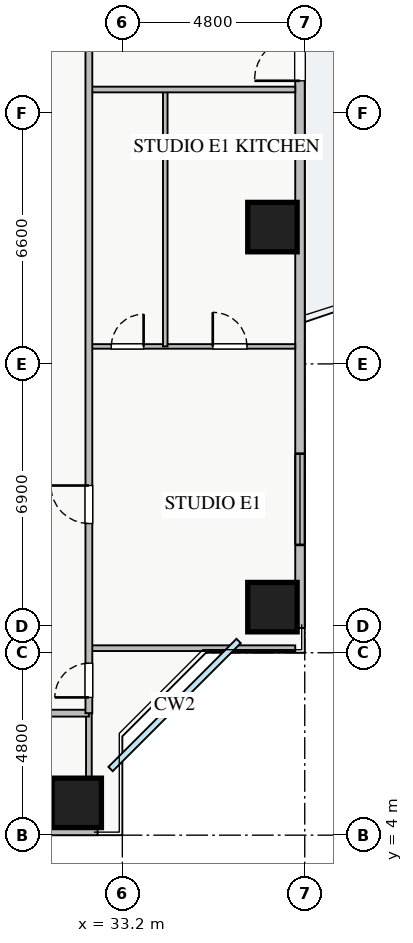
"""IFC4 building model, lengths in metres.
Left out: names, types, materials, properties, quantities, classifications, styles, units other than length and angle.
Written with IfcOpenShell. Run it as: python <this file> out.ifc"""

import sys

from ifc_helpers import new_model, si_unit, direction, frame, frame_2d, origin, origin_2d, place, context, subcontext, project, spatial, rectangle, extrude, source, transform, mapped, element, fill, save


model = new_model("IFC4")
c1 = context("Model", 3, precision=1e-05, world=origin(), true_north=direction((0.0, 1.0)))
c2 = subcontext(c1, "Body", "Model", "MODEL_VIEW")
j1 = project(units=[si_unit("LENGTHUNIT", "METRE"), si_unit("PLANEANGLEUNIT", "RADIAN")], contexts=[c1])
p1 = place(None, origin())
s1 = spatial("IfcSite", under=j1, at=p1, CompositionType="ELEMENT")
p2 = place(p1, origin())
s2 = spatial("IfcBuilding", under=s1, at=p2, CompositionType="ELEMENT")
p3 = place(p2, frame((0.0, 0.0, 69.75)))
s3 = spatial("IfcBuildingStorey", under=s2, at=p3, CompositionType="ELEMENT", Elevation=69.75)
m1 = source(origin(), c2, "Body", "SweptSolid", [
    extrude(rectangle(XDim=1.3, YDim=1.3, at=origin_2d()), origin(), (0.0, 0.0, 1.0), 3.25),
])
for number, where, z_axis, x_axis in (
    (1, (32.0, 4.85, 0.0), (0.0, 0.0, 1.0), (1.0, 0.0, 0.0)),
    (2, (37.15, 10.0, 0.0), (0.0, 0.0, 1.0), (1.0, 0.0, 0.0)),
    (3, (37.15, 20.0, 0.0), (0.0, 0.0, 1.0), (1.0, 0.0, 0.0)),
):
    element("IfcColumn", number, at=place(p3, frame(where, z_axis=z_axis, x_axis=x_axis)), inside=s3, PredefinedType="COLUMN", context=c2, shape_type="MappedRepresentation", body=[
        mapped(m1, transform((0.0, 0.0, 0.0), x_axis=(1.0, 0.0, 0.0), y_axis=(0.0, 1.0, 0.0), z_axis=(0.0, 0.0, 1.0), scale=1.0)),
    ])
p4 = place(p3, frame((5.45, 4.125, 0.0), z_axis=(0.0, 0.0, 1.0), x_axis=(1.0, 0.0, 0.0)))
e4 = element("IfcWall", 4, at=p4, inside=s3, PredefinedType="STANDARD", context=c2, shape_type="SweptSolid", body=[
    extrude(rectangle(XDim=27.1, YDim=0.25, at=frame_2d((13.55, 0.0))), origin(), (0.0, 0.0, 1.0), 2.61),
])
p5 = place(p4, frame((14.4, 0.0, 0.0)))
e5 = element("IfcOpeningElement", 5, at=p5, cuts=e4, PredefinedType="OPENING", context=c2, shape_type="SweptSolid", body=[
    extrude(rectangle(XDim=1.2, YDim=2.1, at=frame_2d((0.6, 1.05))), frame((0.0, 0.135, 0.0), z_axis=(0.0, -1.0, 0.0), x_axis=(1.0, 0.0, 0.0)), (0.0, 0.0, 1.0), 0.27),
])
p6 = place(p4, frame((1.48, 0.0, 0.9)))
e6 = element("IfcOpeningElement", 6, at=p6, cuts=e4, PredefinedType="OPENING", context=c2, shape_type="SweptSolid", body=[
    extrude(rectangle(XDim=1.5, YDim=1.5, at=frame_2d((0.75, 0.75))), frame((0.0, 0.135, 0.0), z_axis=(0.0, -1.0, 0.0), x_axis=(1.0, 0.0, 0.0)), (0.0, 0.0, 1.0), 0.27),
])
p7 = place(p4, frame((9.263, 0.0, 0.9)))
e7 = element("IfcOpeningElement", 7, at=p7, cuts=e4, PredefinedType="OPENING", context=c2, shape_type="SweptSolid", body=[
    extrude(rectangle(XDim=1.8, YDim=1.45, at=frame_2d((0.9, 0.725))), frame((0.0, 0.135, 0.0), z_axis=(0.0, -1.0, 0.0), x_axis=(1.0, 0.0, 0.0)), (0.0, 0.0, 1.0), 0.27),
])
p8 = place(p4, frame((16.188, 0.0, 0.9)))
e8 = element("IfcOpeningElement", 8, at=p8, cuts=e4, PredefinedType="OPENING", context=c2, shape_type="SweptSolid", body=[
    extrude(rectangle(XDim=1.5, YDim=1.45, at=frame_2d((0.75, 0.725))), frame((0.0, 0.135, 0.0), z_axis=(0.0, -1.0, 0.0), x_axis=(1.0, 0.0, 0.0)), (0.0, 0.0, 1.0), 0.27),
])
p9 = place(p4, frame((22.663, 0.0, 0.9)))
e9 = element("IfcOpeningElement", 9, at=p9, cuts=e4, PredefinedType="OPENING", context=c2, shape_type="SweptSolid", body=[
    extrude(rectangle(XDim=2.1, YDim=1.48, at=frame_2d((1.05, 0.74))), frame((0.0, 0.135, 0.0), z_axis=(0.0, -1.0, 0.0), x_axis=(1.0, 0.0, 0.0)), (0.0, 0.0, 1.0), 0.27),
])
p10 = place(p4, frame((5.114, 0.0, 0.9)))
e10 = element("IfcOpeningElement", 10, at=p10, cuts=e4, PredefinedType="OPENING", context=c2, shape_type="SweptSolid", body=[
    extrude(rectangle(XDim=2.4, YDim=1.5, at=frame_2d((1.2, 0.75))), frame((0.0, 0.135, 0.0), z_axis=(0.0, -1.0, 0.0), x_axis=(1.0, 0.0, 0.0)), (0.0, 0.0, 1.0), 0.27),
])
p11 = place(p3, frame((37.875, 9.45, 0.0), z_axis=(0.0, 0.0, 1.0), x_axis=(0.0, 1.0, 0.0)))
e11 = element("IfcWall", 11, at=p11, inside=s3, PredefinedType="STANDARD", context=c2, shape_type="SweptSolid", body=[
    extrude(rectangle(XDim=27.1, YDim=0.25, at=frame_2d((13.55, 0.0))), origin(), (0.0, 0.0, 1.0), 2.61),
])
p12 = place(p11, frame((14.4, 0.0, 0.0)))
e12 = element("IfcOpeningElement", 12, at=p12, cuts=e11, PredefinedType="OPENING", context=c2, shape_type="SweptSolid", body=[
    extrude(rectangle(XDim=1.2, YDim=2.1, at=frame_2d((0.6, 1.05))), frame((0.0, 0.135, 0.0), z_axis=(0.0, -1.0, 0.0), x_axis=(1.0, 0.0, 0.0)), (0.0, 0.0, 1.0), 0.27),
])
p13 = place(p11, frame((2.188, 0.0, 0.9)))
e13 = element("IfcOpeningElement", 13, at=p13, cuts=e11, PredefinedType="OPENING", context=c2, shape_type="SweptSolid", body=[
    extrude(rectangle(XDim=2.4, YDim=1.48, at=frame_2d((1.2, 0.74))), frame((0.0, 0.135, 0.0), z_axis=(0.0, -1.0, 0.0), x_axis=(1.0, 0.0, 0.0)), (0.0, 0.0, 1.0), 0.27),
])
p14 = place(p11, frame((22.663, 0.0, 0.9)))
e14 = element("IfcOpeningElement", 14, at=p14, cuts=e11, PredefinedType="OPENING", context=c2, shape_type="SweptSolid", body=[
    extrude(rectangle(XDim=2.1, YDim=1.48, at=frame_2d((1.05, 0.74))), frame((0.0, 0.135, 0.0), z_axis=(0.0, -1.0, 0.0), x_axis=(1.0, 0.0, 0.0)), (0.0, 0.0, 1.0), 0.27),
])
p15 = place(p11, frame((17.365, 0.0, 0.9)))
e15 = element("IfcOpeningElement", 15, at=p15, cuts=e11, PredefinedType="OPENING", context=c2, shape_type="SweptSolid", body=[
    extrude(rectangle(XDim=0.9, YDim=1.2, at=frame_2d((0.45, 0.6))), frame((0.0, 0.135, 0.0), z_axis=(0.0, -1.0, 0.0), x_axis=(1.0, 0.0, 0.0)), (0.0, 0.0, 1.0), 0.27),
])
p16 = place(p3, frame((32.32, 4.25, 0.0), z_axis=(0.0, 0.0, 1.0), x_axis=(0.0, 1.0, 0.0)))
e16 = element("IfcWall", 16, at=p16, inside=s3, PredefinedType="PARTITIONING", context=c2, shape_type="SweptSolid", body=[
    extrude(rectangle(XDim=2.96, YDim=0.15, at=frame_2d((1.48, 0.0))), origin(), (0.0, 0.0, 1.0), 3.07),
])
p17 = place(p3, frame((8.78, 7.21, 0.0), z_axis=(0.0, 0.0, 1.0), x_axis=(1.0, 0.0, 0.0)))
e17 = element("IfcWall", 17, at=p17, inside=s3, PredefinedType="PARTITIONING", context=c2, shape_type="SweptSolid", body=[
    extrude(rectangle(XDim=23.54, YDim=0.18, at=frame_2d((11.77, 0.0))), origin(), (0.0, 0.0, 1.0), 3.07),
])
p18 = place(p17, frame((4.66, 0.0, 0.0)))
e18 = element("IfcOpeningElement", 18, at=p18, cuts=e17, PredefinedType="OPENING", context=c2, shape_type="SweptSolid", body=[
    extrude(rectangle(XDim=1.0, YDim=2.05, at=frame_2d((0.5, 1.025))), frame((0.0, 0.1, 0.0), z_axis=(0.0, -1.0, 0.0), x_axis=(1.0, 0.0, 0.0)), (0.0, 0.0, 1.0), 0.2),
])
p19 = place(p17, frame((16.43, 0.0, 0.0)))
e19 = element("IfcOpeningElement", 19, at=p19, cuts=e17, PredefinedType="OPENING", context=c2, shape_type="SweptSolid", body=[
    extrude(rectangle(XDim=1.0, YDim=2.05, at=frame_2d((0.5, 1.025))), frame((0.0, 0.1, 0.0), z_axis=(0.0, -1.0, 0.0), x_axis=(1.0, 0.0, 0.0)), (0.0, 0.0, 1.0), 0.2),
])
p20 = place(p3, frame((32.32, 8.92, 0.0), z_axis=(0.0, 0.0, 1.0), x_axis=(1.0, 0.0, 0.0)))
e20 = element("IfcWall", 20, at=p20, inside=s3, PredefinedType="PARTITIONING", context=c2, shape_type="SweptSolid", body=[
    extrude(rectangle(XDim=5.43, YDim=0.15, at=frame_2d((2.715, 0.0))), origin(), (0.0, 0.0, 1.0), 3.07),
])
p21 = place(p3, frame((32.32, 16.86, 0.0), z_axis=(0.0, 0.0, 1.0), x_axis=(1.0, 0.0, 0.0)))
e21 = element("IfcWall", 21, at=p21, inside=s3, PredefinedType="PLUMBINGWALL", context=c2, shape_type="SweptSolid", body=[
    extrude(rectangle(XDim=5.43, YDim=0.12, at=frame_2d((2.715, 0.0))), origin(), (0.0, 0.0, 1.0), 3.07),
])
p22 = place(p21, frame((0.59, 0.0, 0.0)))
e22 = element("IfcOpeningElement", 22, at=p22, cuts=e21, PredefinedType="OPENING", context=c2, shape_type="SweptSolid", body=[
    extrude(rectangle(XDim=0.85, YDim=2.05, at=frame_2d((0.425, 1.025))), frame((0.0, 0.07, 0.0), z_axis=(0.0, -1.0, 0.0), x_axis=(1.0, 0.0, 0.0)), (0.0, 0.0, 1.0), 0.14),
])
p23 = place(p21, frame((3.26, 0.0, 0.0)))
e23 = element("IfcOpeningElement", 23, at=p23, cuts=e21, PredefinedType="OPENING", context=c2, shape_type="SweptSolid", body=[
    extrude(rectangle(XDim=0.9, YDim=2.05, at=frame_2d((0.45, 1.025))), frame((0.0, 0.07, 0.0), z_axis=(0.0, -1.0, 0.0), x_axis=(1.0, 0.0, 0.0)), (0.0, 0.0, 1.0), 0.14),
])
p24 = place(p3, frame((34.33, 16.86, 0.0), z_axis=(0.0, 0.0, 1.0), x_axis=(0.0, 1.0, 0.0)))
e24 = element("IfcWall", 24, at=p24, inside=s3, PredefinedType="PLUMBINGWALL", context=c2, shape_type="SweptSolid", body=[
    extrude(rectangle(XDim=6.76, YDim=0.12, at=frame_2d((3.38, 0.0))), origin(), (0.0, 0.0, 1.0), 3.07),
])
p25 = place(p3, frame((32.32, 23.62, 0.0), z_axis=(0.0, 0.0, 1.0), x_axis=(1.0, 0.0, 0.0)))
e25 = element("IfcWall", 25, at=p25, inside=s3, PredefinedType="PARTITIONING", context=c2, shape_type="SweptSolid", body=[
    extrude(rectangle(XDim=5.43, YDim=0.15, at=frame_2d((2.715, 0.0))), origin(), (0.0, 0.0, 1.0), 3.07),
])
p26 = place(p3, frame((32.32, 7.21, 0.0), z_axis=(0.0, 0.0, 1.0), x_axis=(0.0, 1.0, 0.0)))
e26 = element("IfcWall", 26, at=p26, inside=s3, PredefinedType="PARTITIONING", context=c2, shape_type="SweptSolid", body=[
    extrude(rectangle(XDim=31.23, YDim=0.18, at=frame_2d((15.615, 0.0))), origin(), (0.0, 0.0, 1.0), 2.765),
])
p27 = place(p26, frame((30.09, 0.0, 0.0)))
e27 = element("IfcOpeningElement", 27, at=p27, cuts=e26, PredefinedType="OPENING", context=c2, shape_type="SweptSolid", body=[
    extrude(rectangle(XDim=0.9, YDim=2.05, at=frame_2d((0.45, 1.025))), frame((0.0, 0.1, 0.0), z_axis=(0.0, -1.0, 0.0), x_axis=(1.0, 0.0, 0.0)), (0.0, 0.0, 1.0), 0.2),
])
p28 = place(p26, frame((0.415, 0.0, 0.0)))
e28 = element("IfcOpeningElement", 28, at=p28, cuts=e26, PredefinedType="OPENING", context=c2, shape_type="SweptSolid", body=[
    extrude(rectangle(XDim=0.9, YDim=2.05, at=frame_2d((0.45, 1.025))), frame((0.0, 0.1, 0.0), z_axis=(0.0, -1.0, 0.0), x_axis=(1.0, 0.0, 0.0)), (0.0, 0.0, 1.0), 0.2),
])
p29 = place(p26, frame((4.99, 0.0, 0.0)))
e29 = element("IfcOpeningElement", 29, at=p29, cuts=e26, PredefinedType="OPENING", context=c2, shape_type="SweptSolid", body=[
    extrude(rectangle(XDim=1.0, YDim=2.05, at=frame_2d((0.5, 1.025))), frame((0.0, 0.1, 0.0), z_axis=(0.0, -1.0, 0.0), x_axis=(1.0, 0.0, 0.0)), (0.0, 0.0, 1.0), 0.2),
])
p30 = place(p26, frame((19.355, 0.0, 0.0)))
e30 = element("IfcOpeningElement", 30, at=p30, cuts=e26, PredefinedType="OPENING", context=c2, shape_type="SweptSolid", body=[
    extrude(rectangle(XDim=1.0, YDim=2.05, at=frame_2d((0.5, 1.025))), frame((0.0, 0.1, 0.0), z_axis=(0.0, -1.0, 0.0), x_axis=(1.0, 0.0, 0.0)), (0.0, 0.0, 1.0), 0.2),
])
m2 = source(origin(), c2, "Body", "SweptSolid", [
    extrude(rectangle(XDim=1.2, YDim=2.1, at=frame_2d((0.6, 1.05))), frame((0.0, 0.025, 0.0), z_axis=(0.0, -1.0, 0.0), x_axis=(1.0, 0.0, 0.0)), (0.0, 0.0, 1.0), 0.05),
])
p31 = place(p12, origin())
e31 = element("IfcDoor", 31, at=p31, inside=s3, OperationType="SINGLE_SWING_LEFT", PredefinedType="DOOR", context=c2, shape_type="MappedRepresentation", body=[
    mapped(m2, transform((0.0, 0.0, 0.0), x_axis=(1.0, 0.0, 0.0), y_axis=(0.0, 1.0, 0.0), z_axis=(0.0, 0.0, 1.0), scale=1.0)),
])
fill(e12, e31)
m3 = source(origin(), c2, "Body", "SweptSolid", [
    extrude(rectangle(XDim=2.4, YDim=1.48, at=frame_2d((1.2, 0.74))), frame((0.0, 0.03, 0.0), z_axis=(0.0, -1.0, 0.0), x_axis=(1.0, 0.0, 0.0)), (0.0, 0.0, 1.0), 0.06),
])
p32 = place(p13, origin())
e32 = element("IfcWindow", 32, at=p32, inside=s3, PartitioningType="TRIPLE_PANEL_VERTICAL", PredefinedType="WINDOW", context=c2, shape_type="MappedRepresentation", body=[
    mapped(m3, transform((0.0, 0.0, 0.0), x_axis=(1.0, 0.0, 0.0), y_axis=(0.0, 1.0, 0.0), z_axis=(0.0, 0.0, 1.0), scale=1.0)),
])
fill(e13, e32)
m4 = source(origin(), c2, "Body", "SweptSolid", [
    extrude(rectangle(XDim=0.85, YDim=2.05, at=frame_2d((0.425, 1.025))), frame((0.0, 0.025, 0.0), z_axis=(0.0, -1.0, 0.0), x_axis=(1.0, 0.0, 0.0)), (0.0, 0.0, 1.0), 0.05),
])
p33 = place(p22, origin())
e33 = element("IfcDoor", 33, at=p33, inside=s3, OperationType="SINGLE_SWING_RIGHT", PredefinedType="DOOR", context=c2, shape_type="MappedRepresentation", body=[
    mapped(m4, transform((0.0, 0.0, 0.0), x_axis=(1.0, 0.0, 0.0), y_axis=(0.0, 1.0, 0.0), z_axis=(0.0, 0.0, 1.0), scale=1.0)),
])
fill(e22, e33)
m5 = source(origin(), c2, "Body", "SweptSolid", [
    extrude(rectangle(XDim=0.9, YDim=2.05, at=frame_2d((0.45, 1.025))), frame((0.0, 0.025, 0.0), z_axis=(0.0, -1.0, 0.0), x_axis=(1.0, 0.0, 0.0)), (0.0, 0.0, 1.0), 0.05),
])
p34 = place(p23, origin())
e34 = element("IfcDoor", 34, at=p34, inside=s3, OperationType="SINGLE_SWING_LEFT", PredefinedType="DOOR", context=c2, shape_type="MappedRepresentation", body=[
    mapped(m5, transform((0.0, 0.0, 0.0), x_axis=(1.0, 0.0, 0.0), y_axis=(0.0, 1.0, 0.0), z_axis=(0.0, 0.0, 1.0), scale=1.0)),
])
fill(e23, e34)
p35 = place(p28, origin())
e35 = element("IfcDoor", 35, at=p35, inside=s3, OperationType="SINGLE_SWING_LEFT", PredefinedType="DOOR", context=c2, shape_type="MappedRepresentation", body=[
    mapped(m5, transform((0.0, 0.0, 0.0), x_axis=(1.0, 0.0, 0.0), y_axis=(0.0, 1.0, 0.0), z_axis=(0.0, 0.0, 1.0), scale=1.0)),
])
fill(e28, e35)
m6 = source(origin(), c2, "Body", "SweptSolid", [
    extrude(rectangle(XDim=1.0, YDim=2.05, at=frame_2d((0.5, 1.025))), frame((0.0, 0.025, 0.0), z_axis=(0.0, -1.0, 0.0), x_axis=(1.0, 0.0, 0.0)), (0.0, 0.0, 1.0), 0.05),
])
p36 = place(p29, origin())
e36 = element("IfcDoor", 36, at=p36, inside=s3, OperationType="SINGLE_SWING_RIGHT", PredefinedType="DOOR", context=c2, shape_type="MappedRepresentation", body=[
    mapped(m6, transform((0.0, 0.0, 0.0), x_axis=(1.0, 0.0, 0.0), y_axis=(0.0, 1.0, 0.0), z_axis=(0.0, 0.0, 1.0), scale=1.0)),
])
fill(e29, e36)
save(model, sys.argv[1])
